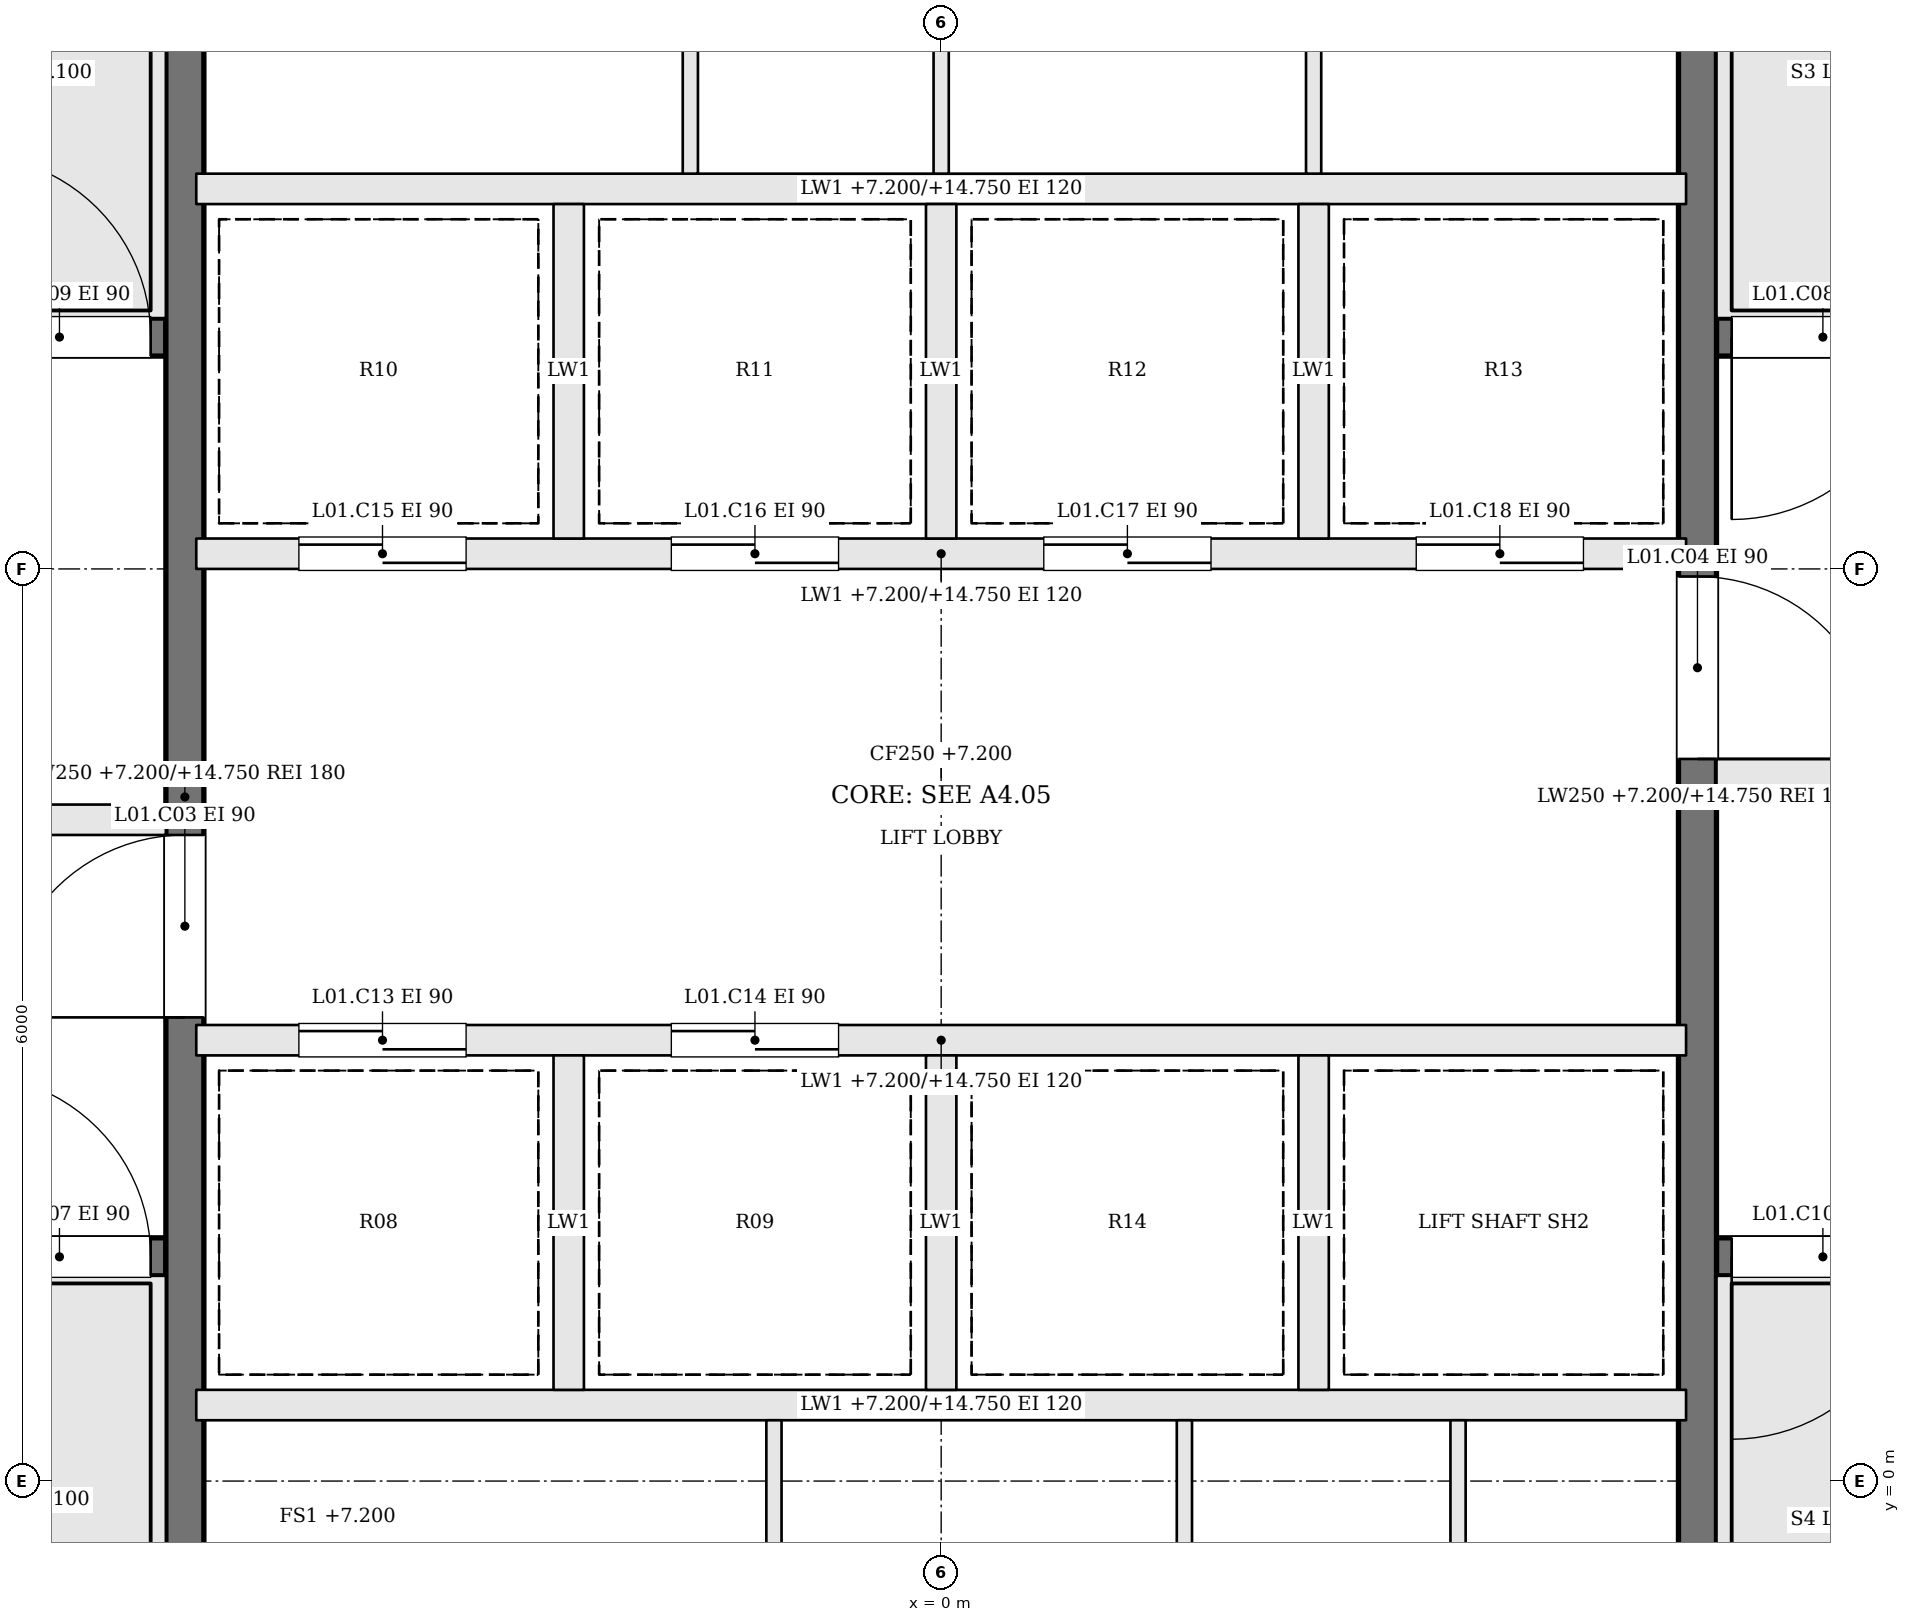
"""IFC4 building model, lengths in metres.
Left out: names, types, materials, properties, quantities, classifications, styles, units other than length and angle.
Written with IfcOpenShell. Run it as: python <this file> out.ifc"""

import sys

from ifc_helpers import new_model, si_unit, direction, frame, frame_2d, origin, place, context, subcontext, project, spatial, rectangle, extrude, element, fill, save


model = new_model("IFC4")
c1 = context("Model", 3, precision=1e-05, world=origin(), true_north=direction((0.0, 1.0)))
c2 = subcontext(c1, "Body", "Model", "MODEL_VIEW")
j1 = project(units=[si_unit("LENGTHUNIT", "METRE"), si_unit("PLANEANGLEUNIT", "RADIAN")], contexts=[c1])
p1 = place(None, origin())
s1 = spatial("IfcSite", under=j1, at=p1, CompositionType="ELEMENT")
p2 = place(p1, origin())
s2 = spatial("IfcBuilding", under=s1, at=p2, CompositionType="ELEMENT")
p3 = place(p2, frame((0.0, 0.0, 7.2)))
s3 = spatial("IfcBuildingStorey", under=s2, at=p3, CompositionType="ELEMENT", Elevation=7.2)
p4 = place(p3, frame((-11.6, 1.475, 0.0), z_axis=(0.0, 0.0, 1.0), x_axis=(1.0, 0.0, 0.0)))
e1 = element("IfcWall", 1, at=p4, inside=s3, PredefinedType="SOLIDWALL", context=c2, shape_type="SweptSolid", body=[
    extrude(rectangle(XDim=6.5, YDim=0.25, at=frame_2d((3.25, 0.0))), origin(), (0.0, 0.0, 1.0), 7.55),
])
p5 = place(p4, frame((5.2, 0.0, 0.0)))
e2 = element("IfcOpeningElement", 2, at=p5, cuts=e1, PredefinedType="OPENING", context=c2, shape_type="SweptSolid", body=[
    extrude(rectangle(XDim=1.2, YDim=2.1, at=frame_2d((0.6, 1.05))), frame((0.0, 0.135, 0.0), z_axis=(0.0, -1.0, 0.0), x_axis=(1.0, 0.0, 0.0)), (0.0, 0.0, 1.0), 0.27),
])
p6 = place(p3, frame((11.6, 7.525, 0.0), z_axis=(0.0, 0.0, 1.0), x_axis=(-1.0, 0.0, 0.0)))
e3 = element("IfcWall", 3, at=p6, inside=s3, PredefinedType="SOLIDWALL", context=c2, shape_type="SweptSolid", body=[
    extrude(rectangle(XDim=6.5, YDim=0.25, at=frame_2d((3.25, 0.0))), origin(), (0.0, 0.0, 1.0), 7.55),
])
p7 = place(p6, frame((5.2, 0.0, 0.0)))
e4 = element("IfcOpeningElement", 4, at=p7, cuts=e3, PredefinedType="OPENING", context=c2, shape_type="SweptSolid", body=[
    extrude(rectangle(XDim=1.2, YDim=2.1, at=frame_2d((0.6, 1.05))), frame((0.0, 0.135, 0.0), z_axis=(0.0, -1.0, 0.0), x_axis=(1.0, 0.0, 0.0)), (0.0, 0.0, 1.0), 0.27),
])
p8 = place(p3, frame((-11.6, 4.35, 0.0), z_axis=(0.0, 0.0, 1.0), x_axis=(1.0, 0.0, 0.0)))
e5 = element("IfcWall", 5, at=p8, inside=s3, PredefinedType="SOLIDWALL", context=c2, shape_type="SweptSolid", body=[
    extrude(rectangle(XDim=6.5, YDim=0.2, at=frame_2d((3.25, 0.0))), origin(), (0.0, 0.0, 1.0), 7.55),
])
p9 = place(p8, frame((3.8, 0.0, 0.0)))
e6 = element("IfcOpeningElement", 6, at=p9, cuts=e5, PredefinedType="OPENING", context=c2, shape_type="SweptSolid", body=[
    extrude(rectangle(XDim=1.2, YDim=2.1, at=frame_2d((0.6, 1.05))), frame((0.0, 0.11, 0.0), z_axis=(0.0, -1.0, 0.0), x_axis=(1.0, 0.0, 0.0)), (0.0, 0.0, 1.0), 0.22),
])
p10 = place(p8, frame((0.5, 0.0, 0.0)))
e7 = element("IfcOpeningElement", 7, at=p10, cuts=e5, PredefinedType="OPENING", context=c2, shape_type="SweptSolid", body=[
    extrude(rectangle(XDim=1.2, YDim=2.1, at=frame_2d((0.6, 1.05))), frame((0.0, 0.11, 0.0), z_axis=(0.0, -1.0, 0.0), x_axis=(1.0, 0.0, 0.0)), (0.0, 0.0, 1.0), 0.22),
])
p11 = place(p3, frame((11.6, 4.65, 0.0), z_axis=(0.0, 0.0, 1.0), x_axis=(-1.0, 0.0, 0.0)))
e8 = element("IfcWall", 8, at=p11, inside=s3, PredefinedType="SOLIDWALL", context=c2, shape_type="SweptSolid", body=[
    extrude(rectangle(XDim=6.5, YDim=0.2, at=frame_2d((3.25, 0.0))), origin(), (0.0, 0.0, 1.0), 7.55),
])
p12 = place(p11, frame((3.8, 0.0, 0.0)))
e9 = element("IfcOpeningElement", 9, at=p12, cuts=e8, PredefinedType="OPENING", context=c2, shape_type="SweptSolid", body=[
    extrude(rectangle(XDim=1.2, YDim=2.1, at=frame_2d((0.6, 1.05))), frame((0.0, 0.11, 0.0), z_axis=(0.0, -1.0, 0.0), x_axis=(1.0, 0.0, 0.0)), (0.0, 0.0, 1.0), 0.22),
])
p13 = place(p11, frame((0.5, 0.0, 0.0)))
e10 = element("IfcOpeningElement", 10, at=p13, cuts=e8, PredefinedType="OPENING", context=c2, shape_type="SweptSolid", body=[
    extrude(rectangle(XDim=1.2, YDim=2.1, at=frame_2d((0.6, 1.05))), frame((0.0, 0.11, 0.0), z_axis=(0.0, -1.0, 0.0), x_axis=(1.0, 0.0, 0.0)), (0.0, 0.0, 1.0), 0.22),
])
p14 = place(p3, frame((-11.6, 7.525, 0.0), z_axis=(0.0, 0.0, 1.0), x_axis=(1.0, 0.0, 0.0)))
e11 = element("IfcWall", 11, at=p14, inside=s3, PredefinedType="SOLIDWALL", context=c2, shape_type="SweptSolid", body=[
    extrude(rectangle(XDim=6.5, YDim=0.25, at=frame_2d((3.25, 0.0))), origin(), (0.0, 0.0, 1.0), 7.55),
])
p15 = place(p14, frame((5.2, 0.0, 0.0)))
e12 = element("IfcOpeningElement", 12, at=p15, cuts=e11, PredefinedType="OPENING", context=c2, shape_type="SweptSolid", body=[
    extrude(rectangle(XDim=1.2, YDim=2.1, at=frame_2d((0.6, 1.05))), frame((0.0, 0.135, 0.0), z_axis=(0.0, -1.0, 0.0), x_axis=(1.0, 0.0, 0.0)), (0.0, 0.0, 1.0), 0.27),
])
p16 = place(p3, frame((11.6, 1.475, 0.0), z_axis=(0.0, 0.0, 1.0), x_axis=(-1.0, 0.0, 0.0)))
e13 = element("IfcWall", 13, at=p16, inside=s3, PredefinedType="SOLIDWALL", context=c2, shape_type="SweptSolid", body=[
    extrude(rectangle(XDim=6.5, YDim=0.25, at=frame_2d((3.25, 0.0))), origin(), (0.0, 0.0, 1.0), 7.55),
])
p17 = place(p16, frame((5.2, 0.0, 0.0)))
e14 = element("IfcOpeningElement", 14, at=p17, cuts=e13, PredefinedType="OPENING", context=c2, shape_type="SweptSolid", body=[
    extrude(rectangle(XDim=1.2, YDim=2.1, at=frame_2d((0.6, 1.05))), frame((0.0, 0.135, 0.0), z_axis=(0.0, -1.0, 0.0), x_axis=(1.0, 0.0, 0.0)), (0.0, 0.0, 1.0), 0.27),
])
p18 = place(p3, frame((-4.975, -1.6, 0.0), z_axis=(0.0, 0.0, 1.0), x_axis=(0.0, 1.0, 0.0)))
e15 = element("IfcWall", 15, at=p18, inside=s3, PredefinedType="SOLIDWALL", context=c2, shape_type="SweptSolid", body=[
    extrude(rectangle(XDim=12.2, YDim=0.25, at=frame_2d((6.1, 0.0))), origin(), (0.0, 0.0, 1.0), 7.55),
])
p19 = place(p18, frame((4.65, 0.0, 0.0)))
e16 = element("IfcOpeningElement", 16, at=p19, cuts=e15, PredefinedType="OPENING", context=c2, shape_type="SweptSolid", body=[
    extrude(rectangle(XDim=1.2, YDim=2.1, at=frame_2d((0.6, 1.05))), frame((0.0, 0.135, 0.0), z_axis=(0.0, -1.0, 0.0), x_axis=(1.0, 0.0, 0.0)), (0.0, 0.0, 1.0), 0.27),
])
p20 = place(p3, frame((4.975, 10.6, 0.0), z_axis=(0.0, 0.0, 1.0), x_axis=(0.0, -1.0, 0.0)))
e17 = element("IfcWall", 17, at=p20, inside=s3, PredefinedType="SOLIDWALL", context=c2, shape_type="SweptSolid", body=[
    extrude(rectangle(XDim=12.2, YDim=0.25, at=frame_2d((6.1, 0.0))), origin(), (0.0, 0.0, 1.0), 7.55),
])
p21 = place(p20, frame((4.65, 0.0, 0.0)))
e18 = element("IfcOpeningElement", 18, at=p21, cuts=e17, PredefinedType="OPENING", context=c2, shape_type="SweptSolid", body=[
    extrude(rectangle(XDim=1.2, YDim=2.1, at=frame_2d((0.6, 1.05))), frame((0.0, 0.135, 0.0), z_axis=(0.0, -1.0, 0.0), x_axis=(1.0, 0.0, 0.0)), (0.0, 0.0, 1.0), 0.27),
])
p22 = place(p3, frame((-4.9, 0.5, 0.0), z_axis=(0.0, 0.0, 1.0), x_axis=(1.0, 0.0, 0.0)))
e19 = element("IfcWall", 19, at=p22, inside=s3, PredefinedType="SOLIDWALL", context=c2, shape_type="SweptSolid", body=[
    extrude(rectangle(XDim=9.8, YDim=0.2, at=frame_2d((4.9, 0.0))), origin(), (0.0, 0.0, 1.0), 7.55),
])
p23 = place(p3, frame((-4.9, 2.9, 0.0), z_axis=(0.0, 0.0, 1.0), x_axis=(1.0, 0.0, 0.0)))
e20 = element("IfcWall", 20, at=p23, inside=s3, PredefinedType="SOLIDWALL", context=c2, shape_type="SweptSolid", body=[
    extrude(rectangle(XDim=9.8, YDim=0.2, at=frame_2d((4.9, 0.0))), origin(), (0.0, 0.0, 1.0), 7.55),
])
p24 = place(p23, frame((0.675, 0.0, 0.0)))
e21 = element("IfcOpeningElement", 21, at=p24, cuts=e20, PredefinedType="OPENING", context=c2, shape_type="SweptSolid", body=[
    extrude(rectangle(XDim=1.1, YDim=2.1, at=frame_2d((0.55, 1.05))), frame((0.0, 0.11, 0.0), z_axis=(0.0, -1.0, 0.0), x_axis=(1.0, 0.0, 0.0)), (0.0, 0.0, 1.0), 0.22),
])
p25 = place(p23, frame((3.125, 0.0, 0.0)))
e22 = element("IfcOpeningElement", 22, at=p25, cuts=e20, PredefinedType="OPENING", context=c2, shape_type="SweptSolid", body=[
    extrude(rectangle(XDim=1.1, YDim=2.1, at=frame_2d((0.55, 1.05))), frame((0.0, 0.11, 0.0), z_axis=(0.0, -1.0, 0.0), x_axis=(1.0, 0.0, 0.0)), (0.0, 0.0, 1.0), 0.22),
])
p26 = place(p3, frame((-4.9, 6.1, 0.0), z_axis=(0.0, 0.0, 1.0), x_axis=(1.0, 0.0, 0.0)))
e23 = element("IfcWall", 23, at=p26, inside=s3, PredefinedType="SOLIDWALL", context=c2, shape_type="SweptSolid", body=[
    extrude(rectangle(XDim=9.8, YDim=0.2, at=frame_2d((4.9, 0.0))), origin(), (0.0, 0.0, 1.0), 7.55),
])
p27 = place(p26, frame((0.675, 0.0, 0.0)))
e24 = element("IfcOpeningElement", 24, at=p27, cuts=e23, PredefinedType="OPENING", context=c2, shape_type="SweptSolid", body=[
    extrude(rectangle(XDim=1.1, YDim=2.1, at=frame_2d((0.55, 1.05))), frame((0.0, 0.11, 0.0), z_axis=(0.0, -1.0, 0.0), x_axis=(1.0, 0.0, 0.0)), (0.0, 0.0, 1.0), 0.22),
])
p28 = place(p26, frame((3.125, 0.0, 0.0)))
e25 = element("IfcOpeningElement", 25, at=p28, cuts=e23, PredefinedType="OPENING", context=c2, shape_type="SweptSolid", body=[
    extrude(rectangle(XDim=1.1, YDim=2.1, at=frame_2d((0.55, 1.05))), frame((0.0, 0.11, 0.0), z_axis=(0.0, -1.0, 0.0), x_axis=(1.0, 0.0, 0.0)), (0.0, 0.0, 1.0), 0.22),
])
p29 = place(p26, frame((5.575, 0.0, 0.0)))
e26 = element("IfcOpeningElement", 26, at=p29, cuts=e23, PredefinedType="OPENING", context=c2, shape_type="SweptSolid", body=[
    extrude(rectangle(XDim=1.1, YDim=2.1, at=frame_2d((0.55, 1.05))), frame((0.0, 0.11, 0.0), z_axis=(0.0, -1.0, 0.0), x_axis=(1.0, 0.0, 0.0)), (0.0, 0.0, 1.0), 0.22),
])
p30 = place(p26, frame((8.025, 0.0, 0.0)))
e27 = element("IfcOpeningElement", 27, at=p30, cuts=e23, PredefinedType="OPENING", context=c2, shape_type="SweptSolid", body=[
    extrude(rectangle(XDim=1.1, YDim=2.1, at=frame_2d((0.55, 1.05))), frame((0.0, 0.11, 0.0), z_axis=(0.0, -1.0, 0.0), x_axis=(1.0, 0.0, 0.0)), (0.0, 0.0, 1.0), 0.22),
])
p31 = place(p3, frame((-4.9, 8.5, 0.0), z_axis=(0.0, 0.0, 1.0), x_axis=(1.0, 0.0, 0.0)))
e28 = element("IfcWall", 28, at=p31, inside=s3, PredefinedType="SOLIDWALL", context=c2, shape_type="SweptSolid", body=[
    extrude(rectangle(XDim=9.8, YDim=0.2, at=frame_2d((4.9, 0.0))), origin(), (0.0, 0.0, 1.0), 7.55),
])
for number, where, z_axis, x_axis in (
    (29, (-2.45, 0.6, 0.0), (0.0, 0.0, 1.0), (0.0, 1.0, 0.0)),
    (30, (0.0, 0.6, 0.0), (0.0, 0.0, 1.0), (0.0, 1.0, 0.0)),
    (31, (2.45, 0.6, 0.0), (0.0, 0.0, 1.0), (0.0, 1.0, 0.0)),
    (32, (-2.45, 6.2, 0.0), (0.0, 0.0, 1.0), (0.0, 1.0, 0.0)),
    (33, (0.0, 6.2, 0.0), (0.0, 0.0, 1.0), (0.0, 1.0, 0.0)),
    (34, (2.45, 6.2, 0.0), (0.0, 0.0, 1.0), (0.0, 1.0, 0.0)),
):
    element("IfcWall", number, at=place(p3, frame(where, z_axis=z_axis, x_axis=x_axis)), inside=s3, PredefinedType="SOLIDWALL", context=c2, shape_type="SweptSolid", body=[
        extrude(rectangle(XDim=2.2, YDim=0.2, at=frame_2d((1.1, 0.0))), origin(), (0.0, 0.0, 1.0), 7.55),
    ])
for number, where, z_axis, x_axis in (
    (35, (-1.1, -1.6, 0.0), (0.0, 0.0, 1.0), (0.0, 1.0, 0.0)),
    (36, (1.6, -1.6, 0.0), (0.0, 0.0, 1.0), (0.0, 1.0, 0.0)),
    (37, (3.4, -1.6, 0.0), (0.0, 0.0, 1.0), (0.0, 1.0, 0.0)),
    (38, (-1.65, 8.6, 0.0), (0.0, 0.0, 1.0), (0.0, 1.0, 0.0)),
    (39, (0.0, 8.6, 0.0), (0.0, 0.0, 1.0), (0.0, 1.0, 0.0)),
    (40, (2.45, 8.6, 0.0), (0.0, 0.0, 1.0), (0.0, 1.0, 0.0)),
):
    element("IfcWall", number, at=place(p3, frame(where, z_axis=z_axis, x_axis=x_axis)), inside=s3, PredefinedType="PARTITIONING", context=c2, shape_type="SweptSolid", body=[
        extrude(rectangle(XDim=2.0, YDim=0.1, at=frame_2d((1.0, 0.0))), origin(), (0.0, 0.0, 1.0), 7.55),
    ])
p32 = place(p19, origin())
e41 = element("IfcDoor", 41, at=p32, inside=s3, OperationType="SINGLE_SWING_LEFT", PredefinedType="DOOR", context=c2, shape_type="SweptSolid", body=[
    extrude(rectangle(XDim=1.2, YDim=2.1, at=frame_2d((0.6, 1.05))), frame((0.0, 0.025, 0.0), z_axis=(0.0, -1.0, 0.0), x_axis=(1.0, 0.0, 0.0)), (0.0, 0.0, 1.0), 0.05),
])
fill(e16, e41)
p33 = place(p21, origin())
e42 = element("IfcDoor", 42, at=p33, inside=s3, OperationType="SINGLE_SWING_RIGHT", PredefinedType="DOOR", context=c2, shape_type="SweptSolid", body=[
    extrude(rectangle(XDim=1.2, YDim=2.1, at=frame_2d((0.6, 1.05))), frame((0.0, 0.025, 0.0), z_axis=(0.0, -1.0, 0.0), x_axis=(1.0, 0.0, 0.0)), (0.0, 0.0, 1.0), 0.05),
])
fill(e18, e42)
p34 = place(p5, origin())
e43 = element("IfcDoor", 43, at=p34, inside=s3, OperationType="SINGLE_SWING_LEFT", PredefinedType="DOOR", context=c2, shape_type="SweptSolid", body=[
    extrude(rectangle(XDim=1.2, YDim=2.1, at=frame_2d((0.6, 1.05))), frame((0.0, 0.025, 0.0), z_axis=(0.0, -1.0, 0.0), x_axis=(1.0, 0.0, 0.0)), (0.0, 0.0, 1.0), 0.05),
])
fill(e2, e43)
p35 = place(p7, origin())
e44 = element("IfcDoor", 44, at=p35, inside=s3, OperationType="SINGLE_SWING_RIGHT", PredefinedType="DOOR", context=c2, shape_type="SweptSolid", body=[
    extrude(rectangle(XDim=1.2, YDim=2.1, at=frame_2d((0.6, 1.05))), frame((0.0, 0.025, 0.0), z_axis=(0.0, -1.0, 0.0), x_axis=(1.0, 0.0, 0.0)), (0.0, 0.0, 1.0), 0.05),
])
fill(e4, e44)
p36 = place(p15, origin())
e45 = element("IfcDoor", 45, at=p36, inside=s3, OperationType="SINGLE_SWING_LEFT", PredefinedType="DOOR", context=c2, shape_type="SweptSolid", body=[
    extrude(rectangle(XDim=1.2, YDim=2.1, at=frame_2d((0.6, 1.05))), frame((0.0, 0.025, 0.0), z_axis=(0.0, -1.0, 0.0), x_axis=(1.0, 0.0, 0.0)), (0.0, 0.0, 1.0), 0.05),
])
fill(e12, e45)
p37 = place(p17, origin())
e46 = element("IfcDoor", 46, at=p37, inside=s3, OperationType="SINGLE_SWING_RIGHT", PredefinedType="DOOR", context=c2, shape_type="SweptSolid", body=[
    extrude(rectangle(XDim=1.2, YDim=2.1, at=frame_2d((0.6, 1.05))), frame((0.0, 0.025, 0.0), z_axis=(0.0, -1.0, 0.0), x_axis=(1.0, 0.0, 0.0)), (0.0, 0.0, 1.0), 0.05),
])
fill(e14, e46)
p38 = place(p24, origin())
e47 = element("IfcDoor", 47, at=p38, inside=s3, OperationType="SLIDING_TO_RIGHT", PredefinedType="DOOR", context=c2, shape_type="SweptSolid", body=[
    extrude(rectangle(XDim=1.1, YDim=2.1, at=frame_2d((0.55, 1.05))), frame((0.0, 0.025, 0.0), z_axis=(0.0, -1.0, 0.0), x_axis=(1.0, 0.0, 0.0)), (0.0, 0.0, 1.0), 0.05),
])
fill(e21, e47)
p39 = place(p25, origin())
e48 = element("IfcDoor", 48, at=p39, inside=s3, OperationType="SLIDING_TO_LEFT", PredefinedType="DOOR", context=c2, shape_type="SweptSolid", body=[
    extrude(rectangle(XDim=1.1, YDim=2.1, at=frame_2d((0.55, 1.05))), frame((0.0, 0.025, 0.0), z_axis=(0.0, -1.0, 0.0), x_axis=(1.0, 0.0, 0.0)), (0.0, 0.0, 1.0), 0.05),
])
fill(e22, e48)
p40 = place(p27, origin())
e49 = element("IfcDoor", 49, at=p40, inside=s3, OperationType="SLIDING_TO_RIGHT", PredefinedType="DOOR", context=c2, shape_type="SweptSolid", body=[
    extrude(rectangle(XDim=1.1, YDim=2.1, at=frame_2d((0.55, 1.05))), frame((0.0, 0.025, 0.0), z_axis=(0.0, -1.0, 0.0), x_axis=(1.0, 0.0, 0.0)), (0.0, 0.0, 1.0), 0.05),
])
fill(e24, e49)
p41 = place(p28, origin())
e50 = element("IfcDoor", 50, at=p41, inside=s3, OperationType="SLIDING_TO_LEFT", PredefinedType="DOOR", context=c2, shape_type="SweptSolid", body=[
    extrude(rectangle(XDim=1.1, YDim=2.1, at=frame_2d((0.55, 1.05))), frame((0.0, 0.025, 0.0), z_axis=(0.0, -1.0, 0.0), x_axis=(1.0, 0.0, 0.0)), (0.0, 0.0, 1.0), 0.05),
])
fill(e25, e50)
p42 = place(p29, origin())
e51 = element("IfcDoor", 51, at=p42, inside=s3, OperationType="SLIDING_TO_RIGHT", PredefinedType="DOOR", context=c2, shape_type="SweptSolid", body=[
    extrude(rectangle(XDim=1.1, YDim=2.1, at=frame_2d((0.55, 1.05))), frame((0.0, 0.025, 0.0), z_axis=(0.0, -1.0, 0.0), x_axis=(1.0, 0.0, 0.0)), (0.0, 0.0, 1.0), 0.05),
])
fill(e26, e51)
p43 = place(p30, origin())
e52 = element("IfcDoor", 52, at=p43, inside=s3, OperationType="SLIDING_TO_LEFT", PredefinedType="DOOR", context=c2, shape_type="SweptSolid", body=[
    extrude(rectangle(XDim=1.1, YDim=2.1, at=frame_2d((0.55, 1.05))), frame((0.0, 0.025, 0.0), z_axis=(0.0, -1.0, 0.0), x_axis=(1.0, 0.0, 0.0)), (0.0, 0.0, 1.0), 0.05),
])
fill(e27, e52)
save(model, sys.argv[1])
